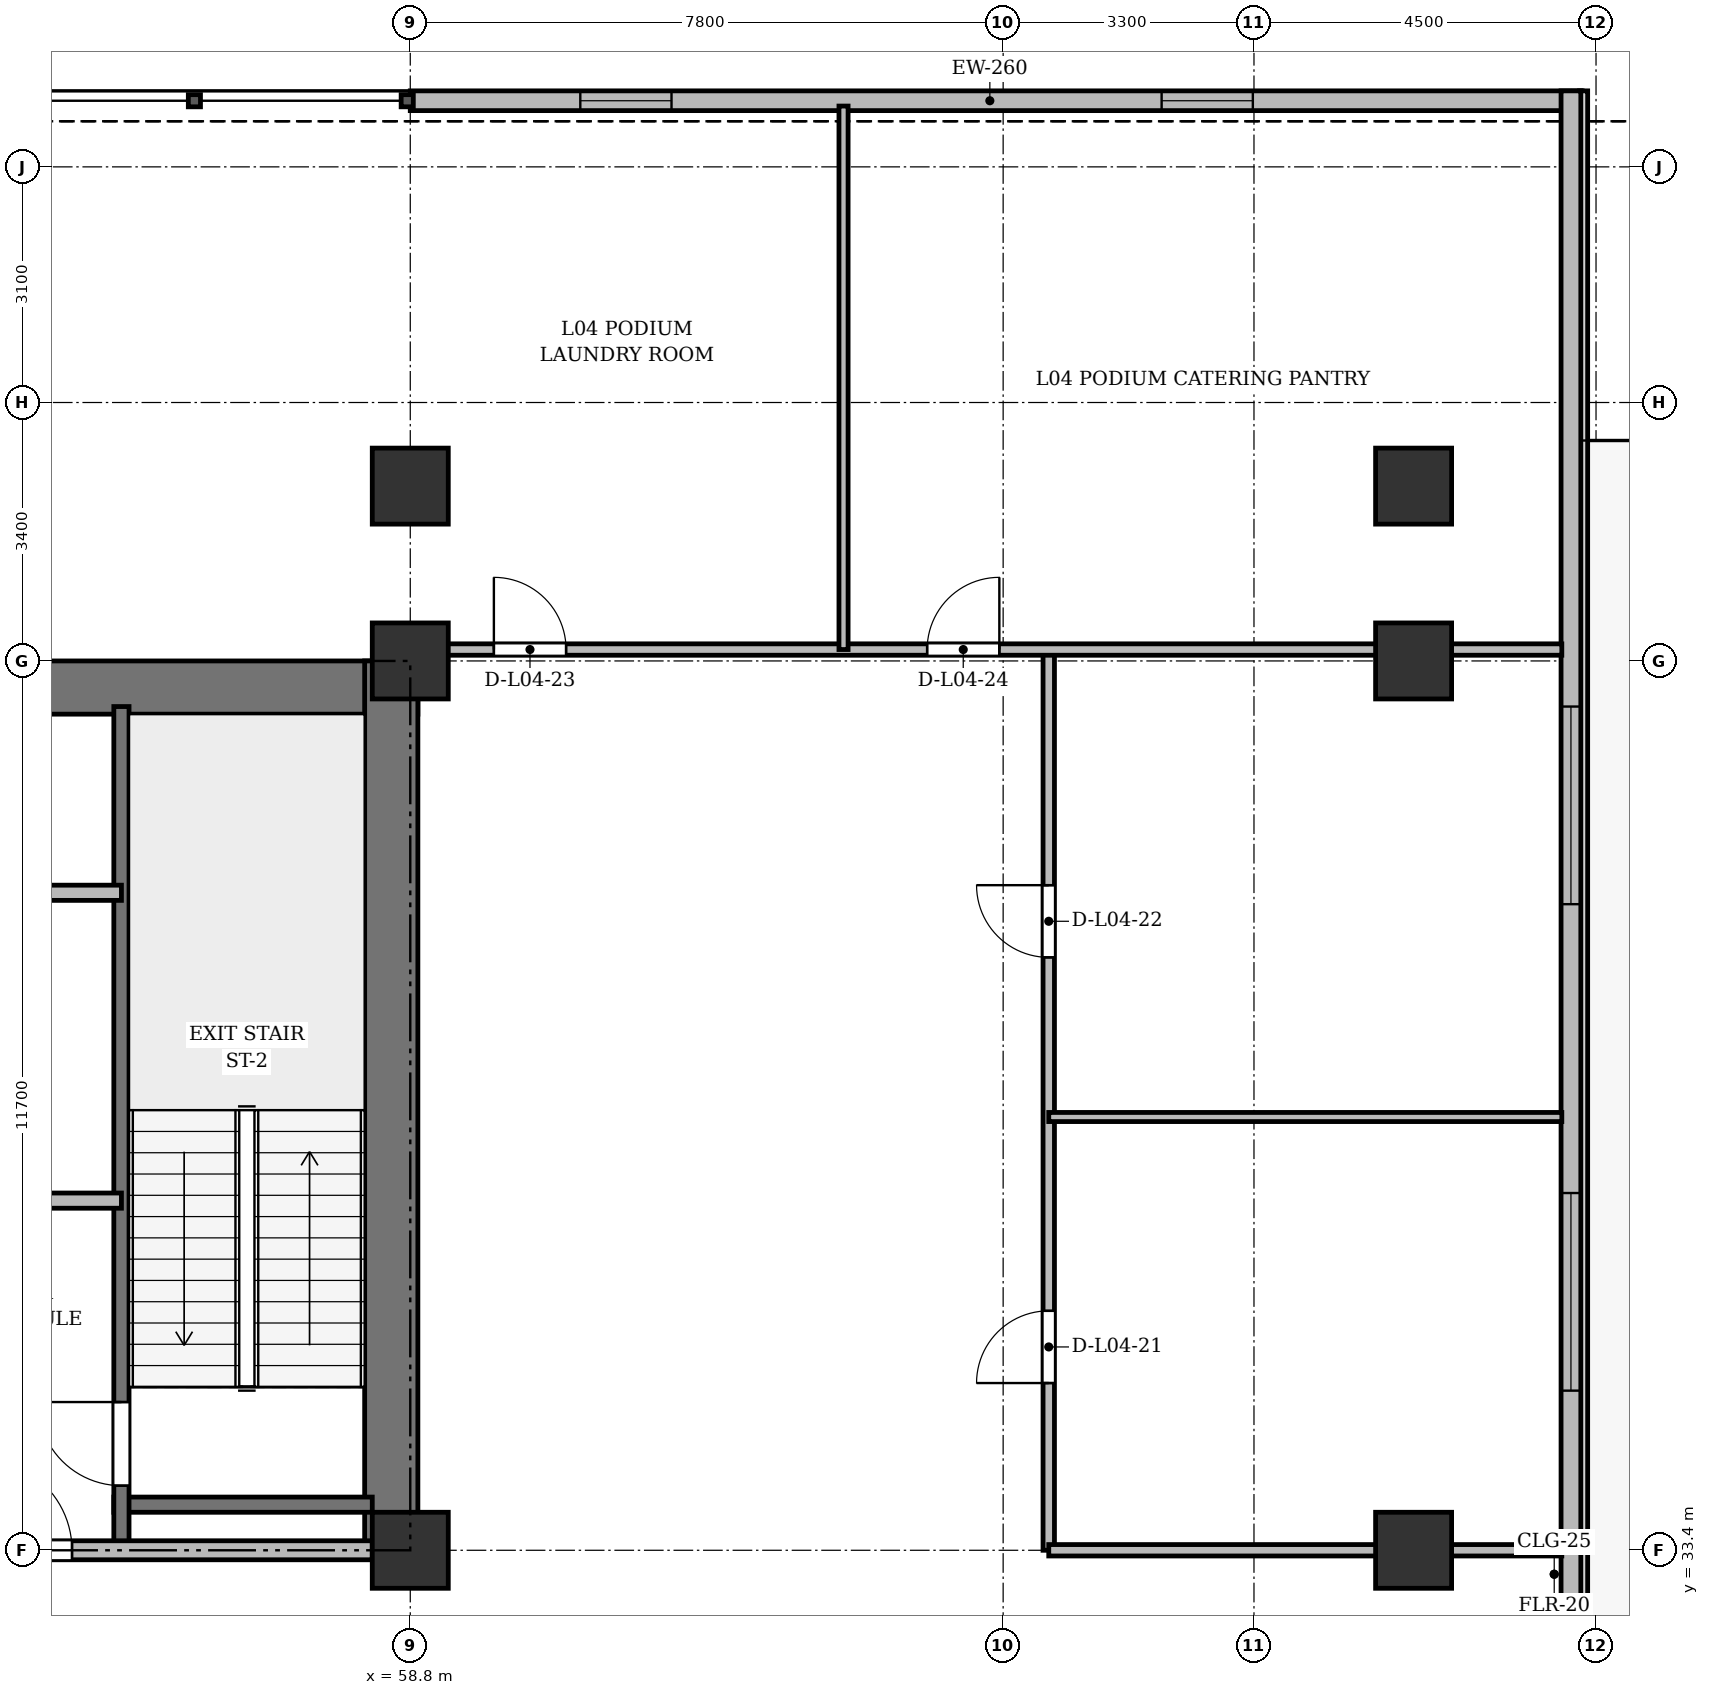
"""IFC4 building model, lengths in metres.
Left out: names, types, materials, properties, quantities, classifications, styles, units other than length and angle.
Written with IfcOpenShell. Run it as: python <this file> out.ifc"""

import sys

from ifc_helpers import new_model, si_unit, direction, frame, frame_2d, origin, origin_2d, place, context, subcontext, project, spatial, rectangle, extrude, source, transform, mapped, element, fill, save


model = new_model("IFC4")
c1 = context("Model", 3, precision=1e-05, world=origin(), true_north=direction((0.0, 1.0)))
c2 = subcontext(c1, "Body", "Model", "MODEL_VIEW")
j1 = project(units=[si_unit("LENGTHUNIT", "METRE"), si_unit("PLANEANGLEUNIT", "RADIAN")], contexts=[c1])
p1 = place(None, origin())
s1 = spatial("IfcSite", under=j1, at=p1, CompositionType="ELEMENT")
p2 = place(p1, origin())
s2 = spatial("IfcBuilding", under=s1, at=p2, CompositionType="ELEMENT")
p3 = place(p2, frame((0.0, 0.0, 18.7)))
s3 = spatial("IfcBuildingStorey", under=s2, at=p3, CompositionType="ELEMENT", Elevation=18.7)
m1 = source(origin(), c2, "Body", "SweptSolid", [
    extrude(rectangle(XDim=1.0, YDim=1.0, at=origin_2d()), origin(), (0.0, 0.0, 1.0), 4.8),
])
for number, where, z_axis, x_axis in (
    (1, (58.8, 33.4, 0.0), (0.0, 0.0, 1.0), (1.0, 0.0, 0.0)),
    (2, (58.8, 45.1, 0.0), (0.0, 0.0, 1.0), (1.0, 0.0, 0.0)),
    (3, (58.8, 47.4, 0.0), (0.0, 0.0, 1.0), (1.0, 0.0, 0.0)),
    (4, (72.0, 33.4, 0.0), (0.0, 0.0, 1.0), (1.0, 0.0, 0.0)),
    (5, (72.0, 45.1, 0.0), (0.0, 0.0, 1.0), (1.0, 0.0, 0.0)),
    (6, (72.0, 47.4, 0.0), (0.0, 0.0, 1.0), (1.0, 0.0, 0.0)),
):
    element("IfcColumn", number, at=place(p3, frame(where, z_axis=z_axis, x_axis=x_axis)), inside=s3, PredefinedType="COLUMN", context=c2, shape_type="MappedRepresentation", body=[
        mapped(m1, transform((0.0, 0.0, 0.0), x_axis=(1.0, 0.0, 0.0), y_axis=(0.0, 1.0, 0.0), z_axis=(0.0, 0.0, 1.0), scale=1.0)),
    ])
p4 = place(p3, frame((58.8, 52.47, 0.0), z_axis=(0.0, 0.0, 1.0), x_axis=(1.0, 0.0, 0.0)))
e7 = element("IfcWall", 7, at=p4, inside=s3, PredefinedType="SOLIDWALL", context=c2, shape_type="SweptSolid", body=[
    extrude(rectangle(XDim=15.25, YDim=0.26, at=frame_2d((7.625, 0.0))), origin(), (0.0, 0.0, 1.0), 4.42),
])
p5 = place(p4, frame((2.237, 0.0, 0.9)))
e8 = element("IfcOpeningElement", 8, at=p5, cuts=e7, PredefinedType="OPENING", context=c2, shape_type="SweptSolid", body=[
    extrude(rectangle(XDim=1.2, YDim=1.65, at=frame_2d((0.6, 0.825))), frame((0.0, 0.14, 0.0), z_axis=(0.0, -1.0, 0.0), x_axis=(1.0, 0.0, 0.0)), (0.0, 0.0, 1.0), 0.28),
])
p6 = place(p4, frame((9.885, 0.0, 0.9)))
e9 = element("IfcOpeningElement", 9, at=p6, cuts=e7, PredefinedType="OPENING", context=c2, shape_type="SweptSolid", body=[
    extrude(rectangle(XDim=1.2, YDim=1.65, at=frame_2d((0.6, 0.825))), frame((0.0, 0.14, 0.0), z_axis=(0.0, -1.0, 0.0), x_axis=(1.0, 0.0, 0.0)), (0.0, 0.0, 1.0), 0.28),
])
p7 = place(p3, frame((74.07, 52.6, 0.0), z_axis=(0.0, 0.0, 1.0), x_axis=(0.0, -1.0, 0.0)))
e10 = element("IfcWall", 10, at=p7, inside=s3, PredefinedType="SOLIDWALL", context=c2, shape_type="SweptSolid", body=[
    extrude(rectangle(XDim=51.0, YDim=0.26, at=frame_2d((25.5, 0.0))), origin(), (0.0, 0.0, 1.0), 2.62),
])
p8 = place(p7, frame((24.75, 0.0, 0.0)))
e11 = element("IfcOpeningElement", 11, at=p8, cuts=e10, PredefinedType="OPENING", context=c2, shape_type="SweptSolid", body=[
    extrude(rectangle(XDim=1.5, YDim=2.25, at=frame_2d((0.75, 1.125))), frame((0.0, 0.14, 0.0), z_axis=(0.0, -1.0, 0.0), x_axis=(1.0, 0.0, 0.0)), (0.0, 0.0, 1.0), 0.28),
])
p9 = place(p7, frame((44.8, 0.0, 0.92)))
e12 = element("IfcOpeningElement", 12, at=p9, cuts=e10, PredefinedType="OPENING", context=c2, shape_type="SweptSolid", body=[
    extrude(rectangle(XDim=2.6, YDim=1.6, at=frame_2d((1.3, 0.8))), frame((0.0, 0.14, 0.0), z_axis=(0.0, -1.0, 0.0), x_axis=(1.0, 0.0, 0.0)), (0.0, 0.0, 1.0), 0.28),
])
p10 = place(p7, frame((37.8, 0.0, 0.92)))
e13 = element("IfcOpeningElement", 13, at=p10, cuts=e10, PredefinedType="OPENING", context=c2, shape_type="SweptSolid", body=[
    extrude(rectangle(XDim=2.6, YDim=1.6, at=frame_2d((1.3, 0.8))), frame((0.0, 0.14, 0.0), z_axis=(0.0, -1.0, 0.0), x_axis=(1.0, 0.0, 0.0)), (0.0, 0.0, 1.0), 0.28),
])
p11 = place(p7, frame((30.8, 0.0, 0.92)))
e14 = element("IfcOpeningElement", 14, at=p11, cuts=e10, PredefinedType="OPENING", context=c2, shape_type="SweptSolid", body=[
    extrude(rectangle(XDim=2.6, YDim=1.6, at=frame_2d((1.3, 0.8))), frame((0.0, 0.14, 0.0), z_axis=(0.0, -1.0, 0.0), x_axis=(1.0, 0.0, 0.0)), (0.0, 0.0, 1.0), 0.28),
])
p12 = place(p7, frame((14.5, 0.0, 0.92)))
e15 = element("IfcOpeningElement", 15, at=p12, cuts=e10, PredefinedType="OPENING", context=c2, shape_type="SweptSolid", body=[
    extrude(rectangle(XDim=2.6, YDim=1.6, at=frame_2d((1.3, 0.8))), frame((0.0, 0.14, 0.0), z_axis=(0.0, -1.0, 0.0), x_axis=(1.0, 0.0, 0.0)), (0.0, 0.0, 1.0), 0.28),
])
p13 = place(p7, frame((8.1, 0.0, 0.92)))
e16 = element("IfcOpeningElement", 16, at=p13, cuts=e10, PredefinedType="OPENING", context=c2, shape_type="SweptSolid", body=[
    extrude(rectangle(XDim=2.6, YDim=1.6, at=frame_2d((1.3, 0.8))), frame((0.0, 0.14, 0.0), z_axis=(0.0, -1.0, 0.0), x_axis=(1.0, 0.0, 0.0)), (0.0, 0.0, 1.0), 0.28),
])
p14 = place(p3, frame((15.5, 44.75, 0.0), z_axis=(0.0, 0.0, 1.0), x_axis=(1.0, 0.0, 0.0)))
e17 = element("IfcWall", 17, at=p14, inside=s3, PredefinedType="SHEAR", context=c2, shape_type="SweptSolid", body=[
    extrude(rectangle(XDim=43.4, YDim=0.7, at=frame_2d((21.7, 0.0))), origin(), (0.0, 0.0, 1.0), 4.42),
])
p15 = place(p3, frame((58.55, 33.4, 0.0), z_axis=(0.0, 0.0, 1.0), x_axis=(0.0, 1.0, 0.0)))
e18 = element("IfcWall", 18, at=p15, inside=s3, PredefinedType="SHEAR", context=c2, shape_type="SweptSolid", body=[
    extrude(rectangle(XDim=11.7, YDim=0.7, at=frame_2d((5.85, 0.0))), origin(), (0.0, 0.0, 1.0), 4.42),
])
p16 = place(p3, frame((54.9, 34.0, 0.0), z_axis=(0.0, 0.0, 1.0), x_axis=(1.0, 0.0, 0.0)))
e19 = element("IfcWall", 19, at=p16, inside=s3, PredefinedType="SHEAR", context=c2, shape_type="SweptSolid", body=[
    extrude(rectangle(XDim=3.4, YDim=0.2, at=frame_2d((1.7, 0.0))), origin(), (0.0, 0.0, 1.0), 4.42),
])
p17 = place(p3, frame((55.0, 33.4, 0.0), z_axis=(0.0, 0.0, 1.0), x_axis=(0.0, 1.0, 0.0)))
e20 = element("IfcWall", 20, at=p17, inside=s3, PredefinedType="SHEAR", context=c2, shape_type="SweptSolid", body=[
    extrude(rectangle(XDim=11.1, YDim=0.2, at=frame_2d((5.55, 0.0))), origin(), (0.0, 0.0, 1.0), 4.42),
])
p18 = place(p17, frame((0.85, 0.0, 0.0)))
e21 = element("IfcOpeningElement", 21, at=p18, cuts=e20, PredefinedType="OPENING", context=c2, shape_type="SweptSolid", body=[
    extrude(rectangle(XDim=1.1, YDim=2.15, at=frame_2d((0.55, 1.075))), frame((0.0, 0.11, 0.0), z_axis=(0.0, -1.0, 0.0), x_axis=(1.0, 0.0, 0.0)), (0.0, 0.0, 1.0), 0.22),
])
p19 = place(p3, frame((47.15, 42.05, 0.0), z_axis=(0.0, 0.0, 1.0), x_axis=(1.0, 0.0, 0.0)))
e22 = element("IfcWall", 22, at=p19, inside=s3, PredefinedType="SOLIDWALL", context=c2, shape_type="SweptSolid", body=[
    extrude(rectangle(XDim=7.85, YDim=0.2, at=frame_2d((3.925, 0.0))), origin(), (0.0, 0.0, 1.0), 4.42),
])
p20 = place(p19, frame((0.75, 0.0, 0.0)))
e23 = element("IfcOpeningElement", 23, at=p20, cuts=e22, PredefinedType="OPENING", context=c2, shape_type="SweptSolid", body=[
    extrude(rectangle(XDim=0.9, YDim=2.1, at=frame_2d((0.45, 1.05))), frame((0.0, 0.11, 0.0), z_axis=(0.0, -1.0, 0.0), x_axis=(1.0, 0.0, 0.0)), (0.0, 0.0, 1.0), 0.22),
])
p21 = place(p19, frame((3.85, 0.0, 0.0)))
e24 = element("IfcOpeningElement", 24, at=p21, cuts=e22, PredefinedType="OPENING", context=c2, shape_type="SweptSolid", body=[
    extrude(rectangle(XDim=0.9, YDim=2.1, at=frame_2d((0.45, 1.05))), frame((0.0, 0.11, 0.0), z_axis=(0.0, -1.0, 0.0), x_axis=(1.0, 0.0, 0.0)), (0.0, 0.0, 1.0), 0.22),
])
p22 = place(p3, frame((52.45, 38.0, 0.0), z_axis=(0.0, 0.0, 1.0), x_axis=(1.0, 0.0, 0.0)))
e25 = element("IfcWall", 25, at=p22, inside=s3, PredefinedType="PARTITIONING", context=c2, shape_type="SweptSolid", body=[
    extrude(rectangle(XDim=2.55, YDim=0.2, at=frame_2d((1.275, 0.0))), origin(), (0.0, 0.0, 1.0), 4.42),
])
p23 = place(p3, frame((47.15, 33.4, 0.0), z_axis=(0.0, 0.0, 1.0), x_axis=(1.0, 0.0, 0.0)))
e26 = element("IfcWall", 26, at=p23, inside=s3, PredefinedType="PARTITIONING", context=c2, shape_type="SweptSolid", body=[
    extrude(rectangle(XDim=11.15, YDim=0.25, at=frame_2d((5.575, 0.0))), origin(), (0.0, 0.0, 1.0), 2.62),
])
p24 = place(p23, frame((0.7, 0.0, 0.0)))
e27 = element("IfcOpeningElement", 27, at=p24, cuts=e26, PredefinedType="OPENING", context=c2, shape_type="SweptSolid", body=[
    extrude(rectangle(XDim=0.95, YDim=2.15, at=frame_2d((0.475, 1.075))), frame((0.0, 0.135, 0.0), z_axis=(0.0, -1.0, 0.0), x_axis=(1.0, 0.0, 0.0)), (0.0, 0.0, 1.0), 0.27),
])
p25 = place(p23, frame((6.0, 0.0, 0.0)))
e28 = element("IfcOpeningElement", 28, at=p25, cuts=e26, PredefinedType="OPENING", context=c2, shape_type="SweptSolid", body=[
    extrude(rectangle(XDim=1.2, YDim=2.15, at=frame_2d((0.6, 1.075))), frame((0.0, 0.135, 0.0), z_axis=(0.0, -1.0, 0.0), x_axis=(1.0, 0.0, 0.0)), (0.0, 0.0, 1.0), 0.27),
])
p26 = place(p3, frame((67.2, 33.4, 0.0), z_axis=(0.0, 0.0, 1.0), x_axis=(0.0, 1.0, 0.0)))
e29 = element("IfcWall", 29, at=p26, inside=s3, PredefinedType="PARTITIONING", context=c2, shape_type="SweptSolid", body=[
    extrude(rectangle(XDim=11.85, YDim=0.15, at=frame_2d((5.925, 0.0))), origin(), (0.0, 0.0, 1.0), 2.62),
])
p27 = place(p26, frame((2.2, 0.0, 0.0)))
e30 = element("IfcOpeningElement", 30, at=p27, cuts=e29, PredefinedType="OPENING", context=c2, shape_type="SweptSolid", body=[
    extrude(rectangle(XDim=0.95, YDim=2.15, at=frame_2d((0.475, 1.075))), frame((0.0, 0.085, 0.0), z_axis=(0.0, -1.0, 0.0), x_axis=(1.0, 0.0, 0.0)), (0.0, 0.0, 1.0), 0.17),
])
p28 = place(p26, frame((7.8, 0.0, 0.0)))
e31 = element("IfcOpeningElement", 31, at=p28, cuts=e29, PredefinedType="OPENING", context=c2, shape_type="SweptSolid", body=[
    extrude(rectangle(XDim=0.95, YDim=2.15, at=frame_2d((0.475, 1.075))), frame((0.0, 0.085, 0.0), z_axis=(0.0, -1.0, 0.0), x_axis=(1.0, 0.0, 0.0)), (0.0, 0.0, 1.0), 0.17),
])
p29 = place(p3, frame((67.2, 33.4, 0.0), z_axis=(0.0, 0.0, 1.0), x_axis=(1.0, 0.0, 0.0)))
e32 = element("IfcWall", 32, at=p29, inside=s3, PredefinedType="PARTITIONING", context=c2, shape_type="SweptSolid", body=[
    extrude(rectangle(XDim=6.75, YDim=0.15, at=frame_2d((3.375, 0.0))), origin(), (0.0, 0.0, 1.0), 2.62),
])
p30 = place(p3, frame((67.2, 39.1, 0.0), z_axis=(0.0, 0.0, 1.0), x_axis=(1.0, 0.0, 0.0)))
e33 = element("IfcWall", 33, at=p30, inside=s3, PredefinedType="PARTITIONING", context=c2, shape_type="SweptSolid", body=[
    extrude(rectangle(XDim=6.75, YDim=0.12, at=frame_2d((3.375, 0.0))), origin(), (0.0, 0.0, 1.0), 2.92),
])
p31 = place(p3, frame((58.6, 45.25, 0.0), z_axis=(0.0, 0.0, 1.0), x_axis=(1.0, 0.0, 0.0)))
e34 = element("IfcWall", 34, at=p31, inside=s3, PredefinedType="PARTITIONING", context=c2, shape_type="SweptSolid", body=[
    extrude(rectangle(XDim=15.35, YDim=0.15, at=frame_2d((7.675, 0.0))), origin(), (0.0, 0.0, 1.0), 2.62),
])
p32 = place(p31, frame((1.3, 0.0, 0.0)))
e35 = element("IfcOpeningElement", 35, at=p32, cuts=e34, PredefinedType="OPENING", context=c2, shape_type="SweptSolid", body=[
    extrude(rectangle(XDim=0.95, YDim=2.15, at=frame_2d((0.475, 1.075))), frame((0.0, 0.085, 0.0), z_axis=(0.0, -1.0, 0.0), x_axis=(1.0, 0.0, 0.0)), (0.0, 0.0, 1.0), 0.17),
])
p33 = place(p31, frame((7.0, 0.0, 0.0)))
e36 = element("IfcOpeningElement", 36, at=p33, cuts=e34, PredefinedType="OPENING", context=c2, shape_type="SweptSolid", body=[
    extrude(rectangle(XDim=0.95, YDim=2.15, at=frame_2d((0.475, 1.075))), frame((0.0, 0.085, 0.0), z_axis=(0.0, -1.0, 0.0), x_axis=(1.0, 0.0, 0.0)), (0.0, 0.0, 1.0), 0.17),
])
p34 = place(p3, frame((64.5, 45.25, 0.0), z_axis=(0.0, 0.0, 1.0), x_axis=(0.0, 1.0, 0.0)))
e37 = element("IfcWall", 37, at=p34, inside=s3, PredefinedType="PARTITIONING", context=c2, shape_type="SweptSolid", body=[
    extrude(rectangle(XDim=7.15, YDim=0.12, at=frame_2d((3.575, 0.0))), origin(), (0.0, 0.0, 1.0), 2.62),
])
m2 = source(origin(), c2, "Body", "SweptSolid", [
    extrude(rectangle(XDim=1.2, YDim=1.65, at=frame_2d((0.6, 0.825))), frame((0.0, 0.03, 0.0), z_axis=(0.0, -1.0, 0.0), x_axis=(1.0, 0.0, 0.0)), (0.0, 0.0, 1.0), 0.06),
])
p35 = place(p5, origin())
e38 = element("IfcWindow", 38, at=p35, inside=s3, PartitioningType="SINGLE_PANEL", PredefinedType="WINDOW", context=c2, shape_type="MappedRepresentation", body=[
    mapped(m2, transform((0.0, 0.0, 0.0), x_axis=(1.0, 0.0, 0.0), y_axis=(0.0, 1.0, 0.0), z_axis=(0.0, 0.0, 1.0), scale=1.0)),
])
fill(e8, e38)
p36 = place(p6, origin())
e39 = element("IfcWindow", 39, at=p36, inside=s3, PartitioningType="SINGLE_PANEL", PredefinedType="WINDOW", context=c2, shape_type="MappedRepresentation", body=[
    mapped(m2, transform((0.0, 0.0, 0.0), x_axis=(1.0, 0.0, 0.0), y_axis=(0.0, 1.0, 0.0), z_axis=(0.0, 0.0, 1.0), scale=1.0)),
])
fill(e9, e39)
m3 = source(origin(), c2, "Body", "SweptSolid", [
    extrude(rectangle(XDim=2.6, YDim=1.6, at=frame_2d((1.3, 0.8))), frame((0.0, 0.03, 0.0), z_axis=(0.0, -1.0, 0.0), x_axis=(1.0, 0.0, 0.0)), (0.0, 0.0, 1.0), 0.06),
])
p37 = place(p12, origin())
e40 = element("IfcWindow", 40, at=p37, inside=s3, PartitioningType="SINGLE_PANEL", PredefinedType="WINDOW", context=c2, shape_type="MappedRepresentation", body=[
    mapped(m3, transform((0.0, 0.0, 0.0), x_axis=(1.0, 0.0, 0.0), y_axis=(0.0, 1.0, 0.0), z_axis=(0.0, 0.0, 1.0), scale=1.0)),
])
fill(e15, e40)
p38 = place(p13, origin())
e41 = element("IfcWindow", 41, at=p38, inside=s3, PartitioningType="SINGLE_PANEL", PredefinedType="WINDOW", context=c2, shape_type="MappedRepresentation", body=[
    mapped(m3, transform((0.0, 0.0, 0.0), x_axis=(1.0, 0.0, 0.0), y_axis=(0.0, 1.0, 0.0), z_axis=(0.0, 0.0, 1.0), scale=1.0)),
])
fill(e16, e41)
m4 = source(origin(), c2, "Body", "SweptSolid", [
    extrude(rectangle(XDim=1.1, YDim=2.15, at=frame_2d((0.55, 1.075))), frame((0.0, 0.025, 0.0), z_axis=(0.0, -1.0, 0.0), x_axis=(1.0, 0.0, 0.0)), (0.0, 0.0, 1.0), 0.05),
])
p39 = place(p18, origin())
e42 = element("IfcDoor", 42, at=p39, inside=s3, OperationType="SINGLE_SWING_RIGHT", PredefinedType="DOOR", context=c2, shape_type="MappedRepresentation", body=[
    mapped(m4, transform((0.0, 0.0, 0.0), x_axis=(1.0, 0.0, 0.0), y_axis=(0.0, 1.0, 0.0), z_axis=(0.0, 0.0, 1.0), scale=1.0)),
])
fill(e21, e42)
m5 = source(origin(), c2, "Body", "SweptSolid", [
    extrude(rectangle(XDim=1.2, YDim=2.15, at=frame_2d((0.6, 1.075))), frame((0.0, 0.025, 0.0), z_axis=(0.0, -1.0, 0.0), x_axis=(1.0, 0.0, 0.0)), (0.0, 0.0, 1.0), 0.05),
])
p40 = place(p25, origin())
e43 = element("IfcDoor", 43, at=p40, inside=s3, OperationType="SINGLE_SWING_LEFT", PredefinedType="DOOR", context=c2, shape_type="MappedRepresentation", body=[
    mapped(m5, transform((0.0, 0.0, 0.0), x_axis=(1.0, 0.0, 0.0), y_axis=(0.0, 1.0, 0.0), z_axis=(0.0, 0.0, 1.0), scale=1.0)),
])
fill(e28, e43)
m6 = source(origin(), c2, "Body", "SweptSolid", [
    extrude(rectangle(XDim=0.95, YDim=2.15, at=frame_2d((0.475, 1.075))), frame((0.0, 0.025, 0.0), z_axis=(0.0, -1.0, 0.0), x_axis=(1.0, 0.0, 0.0)), (0.0, 0.0, 1.0), 0.05),
])
p41 = place(p27, origin())
e44 = element("IfcDoor", 44, at=p41, inside=s3, OperationType="SINGLE_SWING_LEFT", PredefinedType="DOOR", context=c2, shape_type="MappedRepresentation", body=[
    mapped(m6, transform((0.0, 0.0, 0.0), x_axis=(1.0, 0.0, 0.0), y_axis=(0.0, 1.0, 0.0), z_axis=(0.0, 0.0, 1.0), scale=1.0)),
])
fill(e30, e44)
p42 = place(p28, origin())
e45 = element("IfcDoor", 45, at=p42, inside=s3, OperationType="SINGLE_SWING_RIGHT", PredefinedType="DOOR", context=c2, shape_type="MappedRepresentation", body=[
    mapped(m6, transform((0.0, 0.0, 0.0), x_axis=(1.0, 0.0, 0.0), y_axis=(0.0, 1.0, 0.0), z_axis=(0.0, 0.0, 1.0), scale=1.0)),
])
fill(e31, e45)
p43 = place(p32, origin())
e46 = element("IfcDoor", 46, at=p43, inside=s3, OperationType="SINGLE_SWING_LEFT", PredefinedType="DOOR", context=c2, shape_type="MappedRepresentation", body=[
    mapped(m6, transform((0.0, 0.0, 0.0), x_axis=(1.0, 0.0, 0.0), y_axis=(0.0, 1.0, 0.0), z_axis=(0.0, 0.0, 1.0), scale=1.0)),
])
fill(e35, e46)
p44 = place(p33, origin())
e47 = element("IfcDoor", 47, at=p44, inside=s3, OperationType="SINGLE_SWING_RIGHT", PredefinedType="DOOR", context=c2, shape_type="MappedRepresentation", body=[
    mapped(m6, transform((0.0, 0.0, 0.0), x_axis=(1.0, 0.0, 0.0), y_axis=(0.0, 1.0, 0.0), z_axis=(0.0, 0.0, 1.0), scale=1.0)),
])
fill(e36, e47)
save(model, sys.argv[1])
